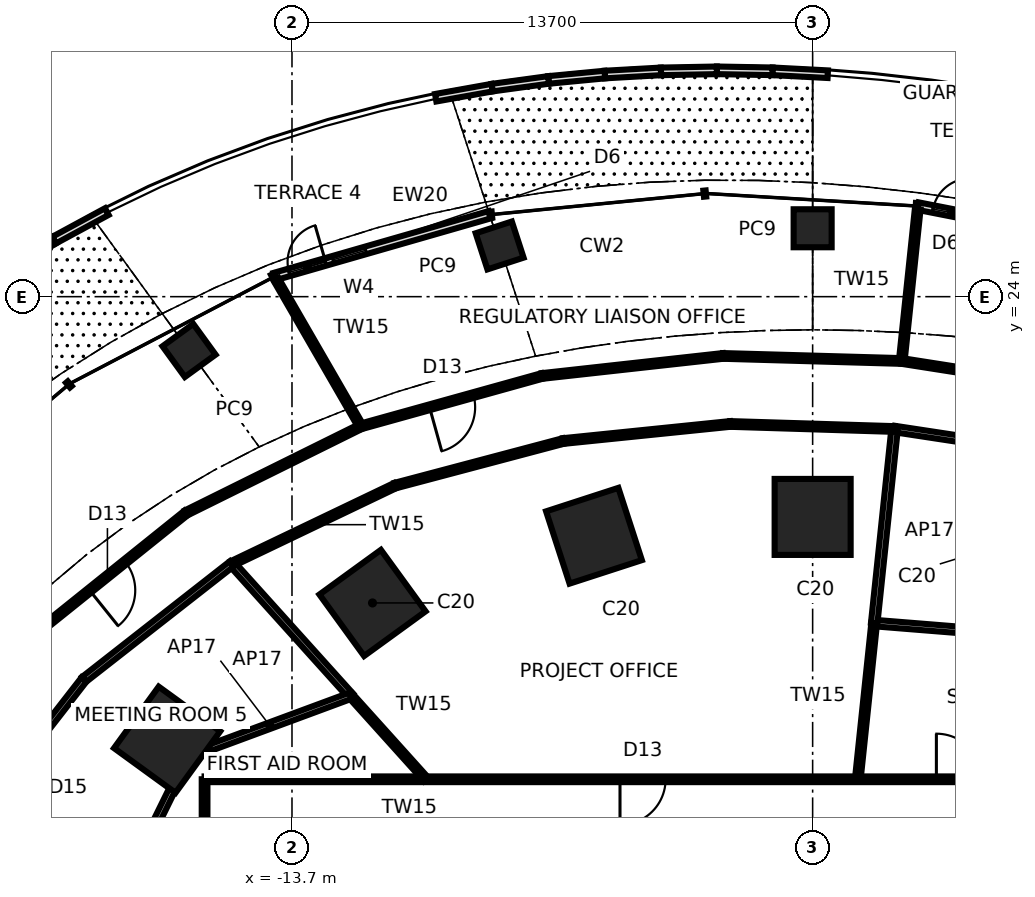
"""IFC4 building model, lengths in metres.
Left out: names, types, materials, properties, quantities, classifications, styles, units other than length and angle.
Written with IfcOpenShell. Run it as: python <this file> out.ifc"""

import sys

from ifc_helpers import new_model, si_unit, direction, frame, frame_2d, origin, origin_2d, place, context, subcontext, project, spatial, rectangle, extrude, element, fill, save


model = new_model("IFC4")
c1 = context("Model", 3, precision=1e-05, world=origin(), true_north=direction((0.0, 1.0)))
c2 = subcontext(c1, "Body", "Model", "MODEL_VIEW")
j1 = project(units=[si_unit("LENGTHUNIT", "METRE"), si_unit("PLANEANGLEUNIT", "RADIAN")], contexts=[c1])
p1 = place(None, origin())
s1 = spatial("IfcSite", under=j1, at=p1, CompositionType="ELEMENT")
p2 = place(p1, origin())
s2 = spatial("IfcBuilding", under=s1, at=p2, CompositionType="ELEMENT")
p3 = place(p2, frame((0.0, 0.0, 15.1)))
s3 = spatial("IfcBuildingStorey", under=s2, at=p3, CompositionType="ELEMENT", Elevation=15.1)
for number, where, z_axis, x_axis in (
    (1, (0.0, 18.204, 0.0), (0.0, 0.0, 1.0), (0.0, 1.0, 0.0)),
    (2, (-5.754, 17.708, 0.0), (0.0, 0.0, 1.0), (-0.309, 0.951, 0.0)),
    (3, (-11.581, 15.94, 0.0), (0.0, 0.0, 1.0), (-0.588, 0.809, 0.0)),
    (4, (-16.986, 12.341, 0.0), (0.0, 0.0, 1.0), (-0.809, 0.588, 0.0)),
):
    element("IfcColumn", number, at=place(p3, frame(where, z_axis=z_axis, x_axis=x_axis)), inside=s3, PredefinedType="COLUMN", context=c2, shape_type="SweptSolid", body=[
        extrude(rectangle(XDim=2.0, YDim=2.0, at=origin_2d()), origin(), (0.0, 0.0, 1.0), 4.5),
    ])
for number, where, z_axis, x_axis in (
    (5, (0.0, 25.8, 0.0), (0.0, 0.0, 1.0), (0.0, 1.0, 0.0)),
    (6, (-8.236, 25.347, 0.0), (0.0, 0.0, 1.0), (-0.309, 0.951, 0.0)),
    (7, (-16.409, 22.584, 0.0), (0.0, 0.0, 1.0), (-0.588, 0.809, 0.0)),
):
    element("IfcColumn", number, at=place(p3, frame(where, z_axis=z_axis, x_axis=x_axis)), inside=s3, PredefinedType="COLUMN", context=c2, shape_type="SweptSolid", body=[
        extrude(rectangle(XDim=1.0, YDim=1.0, at=origin_2d()), origin(), (0.0, 0.0, 1.0), 4.5),
    ])
p4 = place(p3, frame((8.225, 25.312, 0.0), z_axis=(0.0, 0.0, 1.0), x_axis=(-0.981250898219, 0.192734726359, 0.0)))
e8 = element("IfcWall", 8, at=p4, inside=s3, PredefinedType="SOLIDWALL", context=c2, shape_type="SweptSolid", body=[
    extrude(rectangle(XDim=5.556, YDim=0.2, at=frame_2d((2.778, 0.0))), origin(), (0.0, 0.0, 1.0), 4.3),
])
p5 = place(p4, frame((4.156, 0.0, 0.0)))
e9 = element("IfcOpeningElement", 9, at=p5, cuts=e8, PredefinedType="OPENING", context=c2, shape_type="SweptSolid", body=[
    extrude(rectangle(XDim=1.0, YDim=2.4, at=frame_2d((0.5, 1.2))), frame((0.0, 0.11, 0.0), z_axis=(0.0, -1.0, 0.0), x_axis=(1.0, 0.0, 0.0)), (0.0, 0.0, 1.0), 0.22),
])
p6 = place(p4, frame((3.056, 0.0, 0.3)))
e10 = element("IfcOpeningElement", 10, at=p6, cuts=e8, PredefinedType="OPENING", context=c2, shape_type="SweptSolid", body=[
    extrude(rectangle(XDim=0.9, YDim=2.1, at=frame_2d((0.45, 1.05))), frame((0.0, 0.11, 0.0), z_axis=(0.0, -1.0, 0.0), x_axis=(1.0, 0.0, 0.0)), (0.0, 0.0, 1.0), 0.22),
])
p7 = place(p4, frame((4.156, 0.0, 2.7)))
e11 = element("IfcOpeningElement", 11, at=p7, cuts=e8, PredefinedType="OPENING", context=c2, shape_type="SweptSolid", body=[
    extrude(rectangle(XDim=1.0, YDim=0.6, at=frame_2d((0.5, 0.3))), frame((0.0, 0.11, 0.0), z_axis=(0.0, -1.0, 0.0), x_axis=(1.0, 0.0, 0.0)), (0.0, 0.0, 1.0), 0.22),
])
p8 = place(p3, frame((-8.499, 26.156, 0.0), z_axis=(0.0, 0.0, 1.0), x_axis=(-0.961086494425, -0.276247624847, 0.0)))
e12 = element("IfcWall", 12, at=p8, inside=s3, PredefinedType="SOLIDWALL", context=c2, shape_type="SweptSolid", body=[
    extrude(rectangle(XDim=5.892, YDim=0.2, at=frame_2d((2.946, 0.0))), origin(), (0.0, 0.0, 1.0), 4.3),
])
p9 = place(p8, frame((4.492, 0.0, 0.0)))
e13 = element("IfcOpeningElement", 13, at=p9, cuts=e12, PredefinedType="OPENING", context=c2, shape_type="SweptSolid", body=[
    extrude(rectangle(XDim=1.0, YDim=2.4, at=frame_2d((0.5, 1.2))), frame((0.0, 0.11, 0.0), z_axis=(0.0, -1.0, 0.0), x_axis=(1.0, 0.0, 0.0)), (0.0, 0.0, 1.0), 0.22),
])
p10 = place(p8, frame((3.392, 0.0, 0.3)))
e14 = element("IfcOpeningElement", 14, at=p10, cuts=e12, PredefinedType="OPENING", context=c2, shape_type="SweptSolid", body=[
    extrude(rectangle(XDim=0.9, YDim=2.1, at=frame_2d((0.45, 1.05))), frame((0.0, 0.11, 0.0), z_axis=(0.0, -1.0, 0.0), x_axis=(1.0, 0.0, 0.0)), (0.0, 0.0, 1.0), 0.22),
])
p11 = place(p8, frame((4.492, 0.0, 2.7)))
e15 = element("IfcOpeningElement", 15, at=p11, cuts=e12, PredefinedType="OPENING", context=c2, shape_type="SweptSolid", body=[
    extrude(rectangle(XDim=1.0, YDim=0.6, at=frame_2d((0.5, 0.3))), frame((0.0, 0.11, 0.0), z_axis=(0.0, -1.0, 0.0), x_axis=(1.0, 0.0, 0.0)), (0.0, 0.0, 1.0), 0.22),
])
p12 = place(p3, frame((0.398, 29.854, 0.0), z_axis=(0.0, 0.0, 1.0), x_axis=(-0.998632601242, 0.05227741134, 0.0)))
e16 = element("IfcWall", 16, at=p12, inside=s3, PredefinedType="PARAPET", context=c2, shape_type="SweptSolid", body=[
    extrude(rectangle(XDim=1.457, YDim=0.2, at=frame_2d((0.729, 0.0))), origin(), (0.0, 0.0, 1.0), 1.1),
])
p13 = place(p3, frame((-1.057, 29.93, 0.0), z_axis=(0.0, 0.0, 1.0), x_axis=(-0.999846552409, 0.017517752045, 0.0)))
e17 = element("IfcWall", 17, at=p13, inside=s3, PredefinedType="PARAPET", context=c2, shape_type="SweptSolid", body=[
    extrude(rectangle(XDim=1.463, YDim=0.2, at=frame_2d((0.732, 0.0))), origin(), (0.0, 0.0, 1.0), 1.1),
])
p14 = place(p3, frame((-2.52, 29.956, 0.0), z_axis=(0.0, 0.0, 1.0), x_axis=(-0.999824109505, -0.018755000726, 0.0)))
e18 = element("IfcWall", 18, at=p14, inside=s3, PredefinedType="PARAPET", context=c2, shape_type="SweptSolid", body=[
    extrude(rectangle(XDim=1.471, YDim=0.2, at=frame_2d((0.735, 0.0))), origin(), (0.0, 0.0, 1.0), 1.1),
])
p15 = place(p3, frame((-3.991, 29.928, 0.0), z_axis=(0.0, 0.0, 1.0), x_axis=(-0.99841534492, -0.056274319441, 0.0)))
e19 = element("IfcWall", 19, at=p15, inside=s3, PredefinedType="PARAPET", context=c2, shape_type="SweptSolid", body=[
    extrude(rectangle(XDim=1.479, YDim=0.2, at=frame_2d((0.74, 0.0))), origin(), (0.0, 0.0, 1.0), 1.1),
])
p16 = place(p3, frame((-5.468, 29.845, 0.0), z_axis=(0.0, 0.0, 1.0), x_axis=(-0.995448911002, -0.095296723891, 0.0)))
e20 = element("IfcWall", 20, at=p16, inside=s3, PredefinedType="PARAPET", context=c2, shape_type="SweptSolid", body=[
    extrude(rectangle(XDim=1.489, YDim=0.2, at=frame_2d((0.744, 0.0))), origin(), (0.0, 0.0, 1.0), 1.1),
])
p17 = place(p3, frame((-6.949, 29.703, 0.0), z_axis=(0.0, 0.0, 1.0), x_axis=(-0.990810324239, -0.135258646237, 0.0)))
e21 = element("IfcWall", 21, at=p17, inside=s3, PredefinedType="PARAPET", context=c2, shape_type="SweptSolid", body=[
    extrude(rectangle(XDim=1.498, YDim=0.2, at=frame_2d((0.749, 0.0))), origin(), (0.0, 0.0, 1.0), 1.1),
])
p18 = place(p3, frame((-8.434, 29.501, 0.0), z_axis=(0.0, 0.0, 1.0), x_axis=(-0.984312317172, -0.176434866916, 0.0)))
e22 = element("IfcWall", 22, at=p18, inside=s3, PredefinedType="PARAPET", context=c2, shape_type="SweptSolid", body=[
    extrude(rectangle(XDim=1.508, YDim=0.2, at=frame_2d((0.754, 0.0))), origin(), (0.0, 0.0, 1.0), 1.1),
])
p19 = place(p3, frame((-18.572, 26.239, 0.0), z_axis=(0.0, 0.0, 1.0), x_axis=(-0.879254107283, -0.476353035916, 0.0)))
e23 = element("IfcWall", 23, at=p19, inside=s3, PredefinedType="PARAPET", context=c2, shape_type="SweptSolid", body=[
    extrude(rectangle(XDim=1.575, YDim=0.2, at=frame_2d((0.788, 0.0))), origin(), (0.0, 0.0, 1.0), 1.1),
])
p20 = place(p3, frame((-19.957, 25.489, 0.0), z_axis=(0.0, 0.0, 1.0), x_axis=(-0.854614346543, -0.519263246036, 0.0)))
e24 = element("IfcWall", 24, at=p20, inside=s3, PredefinedType="PARAPET", context=c2, shape_type="SweptSolid", body=[
    extrude(rectangle(XDim=1.586, YDim=0.2, at=frame_2d((0.793, 0.0))), origin(), (0.0, 0.0, 1.0), 1.1),
])
p21 = place(p3, frame((1.62, 15.411, 0.0), z_axis=(0.0, 0.0, 1.0), x_axis=(0.996778134856, -0.08020816587, 0.0)))
e25 = element("IfcWall", 25, at=p21, inside=s3, PredefinedType="PARTITIONING", context=c2, shape_type="SweptSolid", body=[
    extrude(rectangle(XDim=3.312, YDim=0.17, at=frame_2d((1.656, 0.0))), origin(), (0.0, 0.0, 1.0), 4.3),
])
p22 = place(p3, frame((2.156, 20.517, 0.0), z_axis=(0.0, 0.0, 1.0), x_axis=(0.988633178346, -0.150347725867, 0.0)))
e26 = element("IfcWall", 26, at=p22, inside=s3, PredefinedType="PARTITIONING", context=c2, shape_type="SweptSolid", body=[
    extrude(rectangle(XDim=4.347, YDim=0.17, at=frame_2d((2.173, 0.0))), origin(), (0.0, 0.0, 1.0), 4.3),
])
p23 = place(p3, frame((7.01, 21.576, 0.0), z_axis=(0.0, 0.0, 1.0), x_axis=(-0.987917974558, 0.154977661437, 0.0)))
e27 = element("IfcWall", 27, at=p23, inside=s3, PredefinedType="PARTITIONING", context=c2, shape_type="SweptSolid", body=[
    extrude(rectangle(XDim=4.723, YDim=0.15, at=frame_2d((2.361, 0.0))), origin(), (0.0, 0.0, 1.0), 4.3),
])
p24 = place(p23, frame((1.761, 0.0, 0.0)))
e28 = element("IfcOpeningElement", 28, at=p24, cuts=e27, PredefinedType="OPENING", context=c2, shape_type="SweptSolid", body=[
    extrude(rectangle(XDim=1.2, YDim=2.4, at=frame_2d((0.6, 1.2))), frame((0.0, 0.085, 0.0), z_axis=(0.0, -1.0, 0.0), x_axis=(1.0, 0.0, 0.0)), (0.0, 0.0, 1.0), 0.17),
])
p25 = place(p3, frame((1.188, 11.3, 0.0), z_axis=(0.0, 0.0, 1.0), x_axis=(0.104543353399, 0.99452033024, 0.0)))
e29 = element("IfcWall", 29, at=p25, inside=s3, PredefinedType="PARTITIONING", context=c2, shape_type="SweptSolid", body=[
    extrude(rectangle(XDim=4.134, YDim=0.15, at=frame_2d((2.067, 0.0))), origin(), (0.0, 0.0, 1.0), 4.3),
])
p26 = place(p3, frame((2.156, 20.517, 0.0), z_axis=(0.0, 0.0, 1.0), x_axis=(-0.104511524142, -0.994523675596, 0.0)))
e30 = element("IfcWall", 30, at=p26, inside=s3, PredefinedType="PARTITIONING", context=c2, shape_type="SweptSolid", body=[
    extrude(rectangle(XDim=5.135, YDim=0.17, at=frame_2d((2.567, 0.0))), origin(), (0.0, 0.0, 1.0), 4.3),
])
p27 = place(p3, frame((2.344, 22.308, 0.0), z_axis=(0.0, 0.0, 1.0), x_axis=(0.104567758594, 0.994517764478, 0.0)))
e31 = element("IfcWall", 31, at=p27, inside=s3, PredefinedType="PARTITIONING", context=c2, shape_type="SweptSolid", body=[
    extrude(rectangle(XDim=4.018, YDim=0.15, at=frame_2d((2.009, 0.0))), origin(), (0.0, 0.0, 1.0), 4.3),
])
p28 = place(p3, frame((2.344, 22.308, 0.0), z_axis=(0.0, 0.0, 1.0), x_axis=(-0.999601512032, 0.028227949675, 0.0)))
e32 = element("IfcWall", 32, at=p28, inside=s3, PredefinedType="PARTITIONING", context=c2, shape_type="SweptSolid", body=[
    extrude(rectangle(XDim=4.705, YDim=0.15, at=frame_2d((2.353, 0.0))), origin(), (0.0, 0.0, 1.0), 4.3),
])
p29 = place(p3, frame((-2.17, 20.65, 0.0), z_axis=(0.0, 0.0, 1.0), x_axis=(0.999527523015, -0.030736472383, 0.0)))
e33 = element("IfcWall", 33, at=p29, inside=s3, PredefinedType="PARTITIONING", context=c2, shape_type="SweptSolid", body=[
    extrude(rectangle(XDim=4.329, YDim=0.15, at=frame_2d((2.165, 0.0))), origin(), (0.0, 0.0, 1.0), 4.3),
])
p30 = place(p3, frame((-2.359, 22.44, 0.0), z_axis=(0.0, 0.0, 1.0), x_axis=(-0.993922826366, -0.110079131669, 0.0)))
e34 = element("IfcWall", 34, at=p30, inside=s3, PredefinedType="PARTITIONING", context=c2, shape_type="SweptSolid", body=[
    extrude(rectangle(XDim=4.791, YDim=0.15, at=frame_2d((2.395, 0.0))), origin(), (0.0, 0.0, 1.0), 4.3),
])
p31 = place(p3, frame((-6.564, 20.201, 0.0), z_axis=(0.0, 0.0, 1.0), x_axis=(0.994813042544, 0.101720255531, 0.0)))
e35 = element("IfcWall", 35, at=p31, inside=s3, PredefinedType="PARTITIONING", context=c2, shape_type="SweptSolid", body=[
    extrude(rectangle(XDim=4.416, YDim=0.15, at=frame_2d((2.208, 0.0))), origin(), (0.0, 0.0, 1.0), 4.3),
])
p32 = place(p3, frame((6.524, 11.3, 0.0), z_axis=(0.0, 0.0, 1.0), x_axis=(-1.0, 0.0, 0.0)))
e36 = element("IfcWall", 36, at=p32, inside=s3, PredefinedType="PARTITIONING", context=c2, shape_type="SweptSolid", body=[
    extrude(rectangle(XDim=22.524, YDim=0.15, at=frame_2d((11.262, 0.0))), origin(), (0.0, 0.0, 1.0), 4.3),
])
p33 = place(p32, frame((10.393, 0.0, 0.0)))
e37 = element("IfcOpeningElement", 37, at=p33, cuts=e36, PredefinedType="OPENING", context=c2, shape_type="SweptSolid", body=[
    extrude(rectangle(XDim=1.2, YDim=2.4, at=frame_2d((0.6, 1.2))), frame((0.0, 0.085, 0.0), z_axis=(0.0, -1.0, 0.0), x_axis=(1.0, 0.0, 0.0)), (0.0, 0.0, 1.0), 0.17),
])
p34 = place(p32, frame((2.068, 0.0, 0.0)))
e38 = element("IfcOpeningElement", 38, at=p34, cuts=e36, PredefinedType="OPENING", context=c2, shape_type="SweptSolid", body=[
    extrude(rectangle(XDim=1.2, YDim=2.4, at=frame_2d((0.6, 1.2))), frame((0.0, 0.085, 0.0), z_axis=(0.0, -1.0, 0.0), x_axis=(1.0, 0.0, 0.0)), (0.0, 0.0, 1.0), 0.17),
])
p35 = place(p3, frame((-7.12, 21.913, 0.0), z_axis=(0.0, 0.0, 1.0), x_axis=(-0.963396906427, -0.268079094089, 0.0)))
e39 = element("IfcWall", 39, at=p35, inside=s3, PredefinedType="PARTITIONING", context=c2, shape_type="SweptSolid", body=[
    extrude(rectangle(XDim=4.947, YDim=0.15, at=frame_2d((2.474, 0.0))), origin(), (0.0, 0.0, 1.0), 4.3),
])
p36 = place(p35, frame((1.873, 0.0, 0.0)))
e40 = element("IfcOpeningElement", 40, at=p36, cuts=e39, PredefinedType="OPENING", context=c2, shape_type="SweptSolid", body=[
    extrude(rectangle(XDim=1.2, YDim=2.4, at=frame_2d((0.6, 1.2))), frame((0.0, 0.085, 0.0), z_axis=(0.0, -1.0, 0.0), x_axis=(1.0, 0.0, 0.0)), (0.0, 0.0, 1.0), 0.17),
])
p37 = place(p3, frame((-10.986, 19.028, 0.0), z_axis=(0.0, 0.0, 1.0), x_axis=(0.966581260218, 0.256360424783, 0.0)))
e41 = element("IfcWall", 41, at=p37, inside=s3, PredefinedType="PARTITIONING", context=c2, shape_type="SweptSolid", body=[
    extrude(rectangle(XDim=4.575, YDim=0.15, at=frame_2d((2.288, 0.0))), origin(), (0.0, 0.0, 1.0), 4.3),
])
p38 = place(p3, frame((-11.886, 20.587, 0.0), z_axis=(0.0, 0.0, 1.0), x_axis=(-0.499968249168, 0.86604373436, 0.0)))
e42 = element("IfcWall", 42, at=p38, inside=s3, PredefinedType="PARTITIONING", context=c2, shape_type="SweptSolid", body=[
    extrude(rectangle(XDim=4.471, YDim=0.15, at=frame_2d((2.235, 0.0))), origin(), (0.0, 0.0, 1.0), 4.3),
])
p39 = place(p3, frame((-11.886, 20.587, 0.0), z_axis=(0.0, 0.0, 1.0), x_axis=(-0.896161272218, -0.443728491509, 0.0)))
e43 = element("IfcWall", 43, at=p39, inside=s3, PredefinedType="PARTITIONING", context=c2, shape_type="SweptSolid", body=[
    extrude(rectangle(XDim=5.133, YDim=0.15, at=frame_2d((2.566, 0.0))), origin(), (0.0, 0.0, 1.0), 4.3),
])
p40 = place(p3, frame((-15.281, 16.972, 0.0), z_axis=(0.0, 0.0, 1.0), x_axis=(0.901954568833, 0.431830934234, 0.0)))
e44 = element("IfcWall", 44, at=p40, inside=s3, PredefinedType="PARTITIONING", context=c2, shape_type="SweptSolid", body=[
    extrude(rectangle(XDim=4.763, YDim=0.15, at=frame_2d((2.381, 0.0))), origin(), (0.0, 0.0, 1.0), 4.3),
])
p41 = place(p3, frame((-12.156, 13.5, 0.0), z_axis=(0.0, 0.0, 1.0), x_axis=(-0.669135077133, 0.74314079995, 0.0)))
e45 = element("IfcWall", 45, at=p41, inside=s3, PredefinedType="PARTITIONING", context=c2, shape_type="SweptSolid", body=[
    extrude(rectangle(XDim=4.671, YDim=0.17, at=frame_2d((2.336, 0.0))), origin(), (0.0, 0.0, 1.0), 4.3),
])
p42 = place(p3, frame((-10.175, 11.3, 0.0), z_axis=(0.0, 0.0, 1.0), x_axis=(-0.669156051145, 0.7431219141, 0.0)))
e46 = element("IfcWall", 46, at=p42, inside=s3, PredefinedType="PARTITIONING", context=c2, shape_type="SweptSolid", body=[
    extrude(rectangle(XDim=2.961, YDim=0.15, at=frame_2d((1.48, 0.0))), origin(), (0.0, 0.0, 1.0), 4.3),
])
p43 = place(p3, frame((-16.486, 18.309, 0.0), z_axis=(0.0, 0.0, 1.0), x_axis=(-0.779898885774, -0.625905526393, 0.0)))
e47 = element("IfcWall", 47, at=p43, inside=s3, PredefinedType="PARTITIONING", context=c2, shape_type="SweptSolid", body=[
    extrude(rectangle(XDim=5.31, YDim=0.15, at=frame_2d((2.655, 0.0))), origin(), (0.0, 0.0, 1.0), 4.3),
])
p44 = place(p43, frame((2.055, 0.0, 0.0)))
e48 = element("IfcOpeningElement", 48, at=p44, cuts=e47, PredefinedType="OPENING", context=c2, shape_type="SweptSolid", body=[
    extrude(rectangle(XDim=1.2, YDim=2.4, at=frame_2d((0.6, 1.2))), frame((0.0, 0.085, 0.0), z_axis=(0.0, -1.0, 0.0), x_axis=(1.0, 0.0, 0.0)), (0.0, 0.0, 1.0), 0.17),
])
p45 = place(p3, frame((-19.17, 13.928, 0.0), z_axis=(0.0, 0.0, 1.0), x_axis=(0.787485179354, 0.616333588487, 0.0)))
e49 = element("IfcWall", 49, at=p45, inside=s3, PredefinedType="PARTITIONING", context=c2, shape_type="SweptSolid", body=[
    extrude(rectangle(XDim=4.938, YDim=0.17, at=frame_2d((2.469, 0.0))), origin(), (0.0, 0.0, 1.0), 4.3),
])
p46 = place(p3, frame((-16.413, 11.925, 0.0), z_axis=(0.0, 0.0, 1.0), x_axis=(0.937814922048, 0.34713566798, 0.0)))
e50 = element("IfcWall", 50, at=p46, inside=s3, PredefinedType="PARTITIONING", context=c2, shape_type="SweptSolid", body=[
    extrude(rectangle(XDim=4.539, YDim=0.17, at=frame_2d((2.27, 0.0))), origin(), (0.0, 0.0, 1.0), 4.3),
])
p47 = place(p3, frame((-18.276, 8.137, 0.0), z_axis=(0.0, 0.0, 1.0), x_axis=(0.44142043443, 0.897300395669, 0.0)))
e51 = element("IfcWall", 51, at=p47, inside=s3, PredefinedType="PARTITIONING", context=c2, shape_type="SweptSolid", body=[
    extrude(rectangle(XDim=4.221, YDim=0.17, at=frame_2d((2.111, 0.0))), origin(), (0.0, 0.0, 1.0), 4.3),
])
p48 = place(p3, frame((-22.284, 9.921, 0.0), z_axis=(0.0, 0.0, 1.0), x_axis=(0.613607456707, 0.789611226537, 0.0)))
e52 = element("IfcWall", 52, at=p48, inside=s3, PredefinedType="PARTITIONING", context=c2, shape_type="SweptSolid", body=[
    extrude(rectangle(XDim=5.074, YDim=0.17, at=frame_2d((2.537, 0.0))), origin(), (0.0, 0.0, 1.0), 4.3),
])
p49 = place(p48, frame((2.012, 0.0, 0.0)))
e53 = element("IfcOpeningElement", 53, at=p49, cuts=e52, PredefinedType="OPENING", context=c2, shape_type="SweptSolid", body=[
    extrude(rectangle(XDim=1.1, YDim=2.4, at=frame_2d((0.55, 1.2))), frame((0.0, 0.095, 0.0), z_axis=(0.0, -1.0, 0.0), x_axis=(1.0, 0.0, 0.0)), (0.0, 0.0, 1.0), 0.19),
])
p50 = place(p3, frame((-16.0, 11.3, 0.0), z_axis=(0.0, 0.0, 1.0), x_axis=(0.0, -1.0, 0.0)))
e54 = element("IfcWall", 54, at=p50, inside=s3, PredefinedType="PARTITIONING", context=c2, shape_type="SweptSolid", body=[
    extrude(rectangle(XDim=6.979, YDim=0.15, at=frame_2d((3.49, 0.0))), origin(), (0.0, 0.0, 1.0), 4.3),
])
p51 = place(p50, frame((2.915, 0.0, 0.0)))
e55 = element("IfcOpeningElement", 55, at=p51, cuts=e54, PredefinedType="OPENING", context=c2, shape_type="SweptSolid", body=[
    extrude(rectangle(XDim=1.2, YDim=2.4, at=frame_2d((0.6, 1.2))), frame((0.0, 0.085, 0.0), z_axis=(0.0, -1.0, 0.0), x_axis=(1.0, 0.0, 0.0)), (0.0, 0.0, 1.0), 0.17),
])
p52 = place(p5, frame((1.0, 0.0, 0.0), z_axis=(0.0, 0.0, 1.0), x_axis=(-1.0, 0.0, 0.0)))
e56 = element("IfcDoor", 56, at=p52, inside=s3, OperationType="SINGLE_SWING_RIGHT", PredefinedType="DOOR", context=c2, shape_type="SweptSolid", body=[
    extrude(rectangle(XDim=1.0, YDim=2.4, at=frame_2d((0.5, 1.2))), frame((0.0, 0.025, 0.0), z_axis=(0.0, -1.0, 0.0), x_axis=(1.0, 0.0, 0.0)), (0.0, 0.0, 1.0), 0.05),
])
fill(e9, e56)
p53 = place(p7, origin())
e57 = element("IfcWindow", 57, at=p53, inside=s3, PartitioningType="SINGLE_PANEL", PredefinedType="WINDOW", context=c2, shape_type="SweptSolid", body=[
    extrude(rectangle(XDim=1.0, YDim=0.6, at=frame_2d((0.5, 0.3))), frame((0.0, 0.03, 0.0), z_axis=(0.0, -1.0, 0.0), x_axis=(1.0, 0.0, 0.0)), (0.0, 0.0, 1.0), 0.06),
])
fill(e11, e57)
p54 = place(p9, frame((1.0, 0.0, 0.0), z_axis=(0.0, 0.0, 1.0), x_axis=(-1.0, 0.0, 0.0)))
e58 = element("IfcDoor", 58, at=p54, inside=s3, OperationType="SINGLE_SWING_RIGHT", PredefinedType="DOOR", context=c2, shape_type="SweptSolid", body=[
    extrude(rectangle(XDim=1.0, YDim=2.4, at=frame_2d((0.5, 1.2))), frame((0.0, 0.025, 0.0), z_axis=(0.0, -1.0, 0.0), x_axis=(1.0, 0.0, 0.0)), (0.0, 0.0, 1.0), 0.05),
])
fill(e13, e58)
p55 = place(p10, origin())
e59 = element("IfcWindow", 59, at=p55, inside=s3, PartitioningType="SINGLE_PANEL", PredefinedType="WINDOW", context=c2, shape_type="SweptSolid", body=[
    extrude(rectangle(XDim=0.9, YDim=2.1, at=frame_2d((0.45, 1.05))), frame((0.0, 0.03, 0.0), z_axis=(0.0, -1.0, 0.0), x_axis=(1.0, 0.0, 0.0)), (0.0, 0.0, 1.0), 0.06),
])
fill(e14, e59)
p56 = place(p11, origin())
e60 = element("IfcWindow", 60, at=p56, inside=s3, PartitioningType="SINGLE_PANEL", PredefinedType="WINDOW", context=c2, shape_type="SweptSolid", body=[
    extrude(rectangle(XDim=1.0, YDim=0.6, at=frame_2d((0.5, 0.3))), frame((0.0, 0.03, 0.0), z_axis=(0.0, -1.0, 0.0), x_axis=(1.0, 0.0, 0.0)), (0.0, 0.0, 1.0), 0.06),
])
fill(e15, e60)
p57 = place(p33, origin())
e61 = element("IfcDoor", 61, at=p57, inside=s3, OperationType="SINGLE_SWING_RIGHT", PredefinedType="DOOR", context=c2, shape_type="SweptSolid", body=[
    extrude(rectangle(XDim=1.2, YDim=2.4, at=frame_2d((0.6, 1.2))), frame((0.0, 0.025, 0.0), z_axis=(0.0, -1.0, 0.0), x_axis=(1.0, 0.0, 0.0)), (0.0, 0.0, 1.0), 0.05),
])
fill(e37, e61)
p58 = place(p34, frame((1.2, 0.0, 0.0), z_axis=(0.0, 0.0, 1.0), x_axis=(-1.0, 0.0, 0.0)))
e62 = element("IfcDoor", 62, at=p58, inside=s3, OperationType="SINGLE_SWING_LEFT", PredefinedType="DOOR", context=c2, shape_type="SweptSolid", body=[
    extrude(rectangle(XDim=1.2, YDim=2.4, at=frame_2d((0.6, 1.2))), frame((0.0, 0.025, 0.0), z_axis=(0.0, -1.0, 0.0), x_axis=(1.0, 0.0, 0.0)), (0.0, 0.0, 1.0), 0.05),
])
fill(e38, e62)
p59 = place(p36, origin())
e63 = element("IfcDoor", 63, at=p59, inside=s3, OperationType="SINGLE_SWING_RIGHT", PredefinedType="DOOR", context=c2, shape_type="SweptSolid", body=[
    extrude(rectangle(XDim=1.2, YDim=2.4, at=frame_2d((0.6, 1.2))), frame((0.0, 0.025, 0.0), z_axis=(0.0, -1.0, 0.0), x_axis=(1.0, 0.0, 0.0)), (0.0, 0.0, 1.0), 0.05),
])
fill(e40, e63)
p60 = place(p44, origin())
e64 = element("IfcDoor", 64, at=p60, inside=s3, OperationType="SINGLE_SWING_RIGHT", PredefinedType="DOOR", context=c2, shape_type="SweptSolid", body=[
    extrude(rectangle(XDim=1.2, YDim=2.4, at=frame_2d((0.6, 1.2))), frame((0.0, 0.025, 0.0), z_axis=(0.0, -1.0, 0.0), x_axis=(1.0, 0.0, 0.0)), (0.0, 0.0, 1.0), 0.05),
])
fill(e48, e64)
save(model, sys.argv[1])
